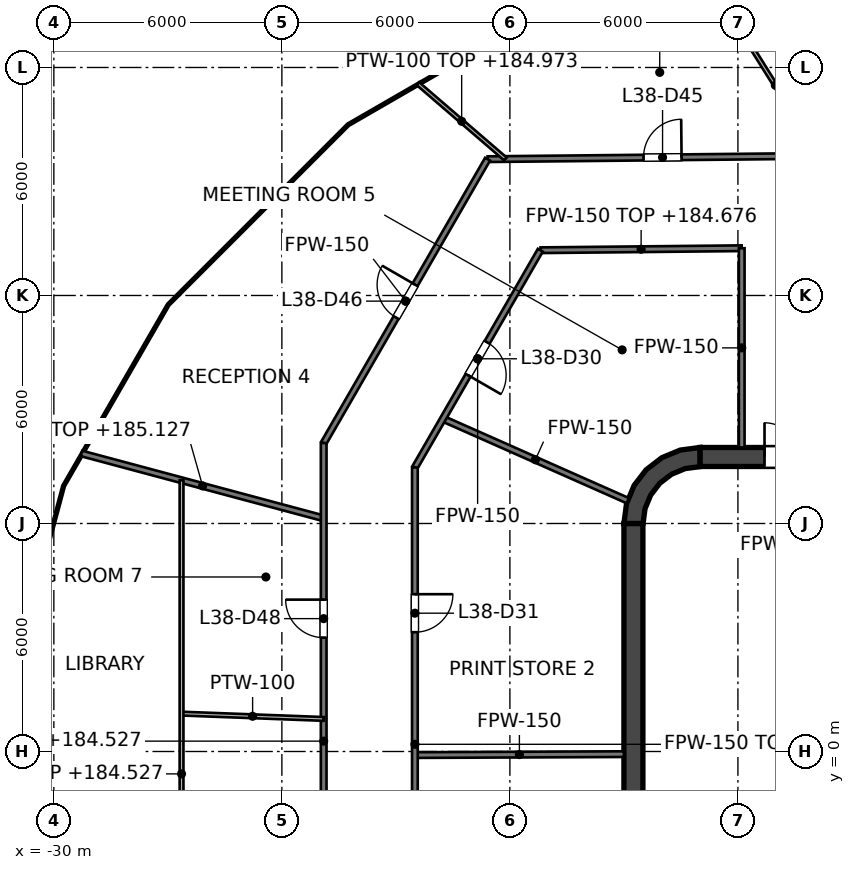
"""IFC4 building model, lengths in metres.
Left out: names, types, materials, properties, quantities, classifications, styles, units other than length and angle.
Written with IfcOpenShell. Run it as: python <this file> out.ifc"""

import sys

from ifc_helpers import new_model, si_unit, direction, frame, frame_2d, origin, place, context, subcontext, project, spatial, polyline, rectangle, outline, extrude, element, fill, save


model = new_model("IFC4")
c1 = context("Model", 3, precision=1e-05, world=origin(), true_north=direction((0.0, 1.0)))
c2 = subcontext(c1, "Body", "Model", "MODEL_VIEW")
j1 = project(units=[si_unit("LENGTHUNIT", "METRE"), si_unit("PLANEANGLEUNIT", "RADIAN")], contexts=[c1])
p1 = place(None, origin())
s1 = spatial("IfcSite", under=j1, at=p1, CompositionType="ELEMENT")
p2 = place(p1, origin())
s2 = spatial("IfcBuilding", under=s1, at=p2, CompositionType="ELEMENT")
p3 = place(p2, frame((0.0, 0.0, 181.6)))
s3 = spatial("IfcBuildingStorey", under=s2, at=p3, CompositionType="ELEMENT", Elevation=181.6)
p4 = place(p3, frame((-13.0, 7.75, 0.0), z_axis=(0.0, 0.0, 1.0), x_axis=(1.0, 0.0, 0.0)))
e1 = element("IfcWall", 1, at=p4, inside=s3, PredefinedType="SHEAR", context=c2, shape_type="SweptSolid", body=[
    extrude(rectangle(XDim=26.0, YDim=0.5, at=frame_2d((13.0, 0.0))), origin(), (0.0, 0.0, 1.0), 4.0),
])
p5 = place(p4, frame((1.7, 0.0, 0.0)))
e2 = element("IfcOpeningElement", 2, at=p5, cuts=e1, PredefinedType="OPENING", context=c2, shape_type="SweptSolid", body=[
    extrude(rectangle(XDim=1.8, YDim=2.1, at=frame_2d((0.9, 1.05))), frame((0.0, 0.25, 0.0), z_axis=(0.0, -1.0, 0.0), x_axis=(1.0, 0.0, 0.0)), (0.0, 0.0, 1.0), 0.5),
])
p6 = place(p4, frame((22.5, 0.0, 0.0)))
e3 = element("IfcOpeningElement", 3, at=p6, cuts=e1, PredefinedType="OPENING", context=c2, shape_type="SweptSolid", body=[
    extrude(rectangle(XDim=1.8, YDim=2.1, at=frame_2d((0.9, 1.05))), frame((0.0, 0.25, 0.0), z_axis=(0.0, -1.0, 0.0), x_axis=(1.0, 0.0, 0.0)), (0.0, 0.0, 1.0), 0.5),
])
p7 = place(p3, frame((-14.75, -6.0, 0.0), z_axis=(0.0, 0.0, 1.0), x_axis=(0.0, 1.0, 0.0)))
e4 = element("IfcWall", 4, at=p7, inside=s3, PredefinedType="SHEAR", context=c2, shape_type="SweptSolid", body=[
    extrude(rectangle(XDim=12.0, YDim=0.5, at=frame_2d((6.0, 0.0))), origin(), (0.0, 0.0, 1.0), 4.0),
])
p8 = place(p3, origin())
e5 = element("IfcWall", 5, at=p8, inside=s3, PredefinedType="SHEAR", context=c2, shape_type="SweptSolid", body=[
    extrude(outline(polyline([(-15.0, 6.0), (-14.496, 6.0), (-14.445, 6.387), (-14.295, 6.748), (-14.058, 7.058), (-13.748, 7.295), (-13.387, 7.445), (-13.0, 7.496), (-13.0, 8.0), (-13.518, 7.932), (-14.0, 7.732), (-14.414, 7.414), (-14.732, 7.0), (-14.932, 6.518), (-15.0, 6.0)])), origin(), (0.0, 0.0, 1.0), 4.0),
])
p9 = place(p3, frame((-11.8, -7.5, 0.0), z_axis=(0.0, 0.0, 1.0), x_axis=(0.0, 1.0, 0.0)))
e6 = element("IfcWall", 6, at=p9, inside=s3, PredefinedType="SOLIDWALL", context=c2, shape_type="SweptSolid", body=[
    extrude(rectangle(XDim=15.0, YDim=0.4, at=frame_2d((7.5, 0.0))), origin(), (0.0, 0.0, 1.0), 3.85),
])
p10 = place(p9, frame((11.3, 0.0, 0.0)))
e7 = element("IfcOpeningElement", 7, at=p10, cuts=e6, PredefinedType="OPENING", context=c2, shape_type="SweptSolid", body=[
    extrude(rectangle(XDim=1.1, YDim=2.1, at=frame_2d((0.55, 1.05))), frame((0.0, 0.2, 0.0), z_axis=(0.0, -1.0, 0.0), x_axis=(1.0, 0.0, 0.0)), (0.0, 0.0, 1.0), 0.4),
])
p11 = place(p9, frame((8.4, 0.0, 0.0)))
e8 = element("IfcOpeningElement", 8, at=p11, cuts=e6, PredefinedType="OPENING", context=c2, shape_type="SweptSolid", body=[
    extrude(rectangle(XDim=1.1, YDim=2.1, at=frame_2d((0.55, 1.05))), frame((0.0, 0.2, 0.0), z_axis=(0.0, -1.0, 0.0), x_axis=(1.0, 0.0, 0.0)), (0.0, 0.0, 1.0), 0.4),
])
p12 = place(p9, frame((5.5, 0.0, 0.0)))
e9 = element("IfcOpeningElement", 9, at=p12, cuts=e6, PredefinedType="OPENING", context=c2, shape_type="SweptSolid", body=[
    extrude(rectangle(XDim=1.1, YDim=2.1, at=frame_2d((0.55, 1.05))), frame((0.0, 0.2, 0.0), z_axis=(0.0, -1.0, 0.0), x_axis=(1.0, 0.0, 0.0)), (0.0, 0.0, 1.0), 0.4),
])
p13 = place(p9, frame((13.697, 0.0, 0.0)))
e10 = element("IfcOpeningElement", 10, at=p13, cuts=e6, PredefinedType="OPENING", context=c2, shape_type="SweptSolid", body=[
    extrude(rectangle(XDim=0.9, YDim=2.1, at=frame_2d((0.45, 1.05))), frame((0.0, 0.2, 0.0), z_axis=(0.0, -1.0, 0.0), x_axis=(1.0, 0.0, 0.0)), (0.0, 0.0, 1.0), 0.4),
])
p14 = place(p9, frame((0.403, 0.0, 0.0)))
e11 = element("IfcOpeningElement", 11, at=p14, cuts=e6, PredefinedType="OPENING", context=c2, shape_type="SweptSolid", body=[
    extrude(rectangle(XDim=0.9, YDim=2.1, at=frame_2d((0.45, 1.05))), frame((0.0, 0.2, 0.0), z_axis=(0.0, -1.0, 0.0), x_axis=(1.0, 0.0, 0.0)), (0.0, 0.0, 1.0), 0.4),
])
e12 = element("IfcWall", 12, at=p8, inside=s3, PredefinedType="SOLIDWALL", context=c2, shape_type="SweptSolid", body=[
    extrude(outline(polyline([(-12.0, -5.925), (-12.0, -5.675), (-14.25, -5.675), (-14.25, -3.025), (-12.0, -3.025), (-12.0, -2.775), (-14.25, -2.775), (-14.25, -0.125), (-12.0, -0.125), (-12.0, 0.125), (-14.25, 0.125), (-14.25, 2.775), (-12.0, 2.775), (-12.0, 3.025), (-14.25, 3.025), (-14.25, 5.675), (-12.0, 5.675), (-12.0, 5.925), (-14.25, 5.925), (-14.5, 5.925), (-14.5, 5.675), (-14.5, 3.025), (-14.5, 2.775), (-14.5, 0.125), (-14.5, -0.125), (-14.5, -2.775), (-14.5, -3.025), (-14.5, -5.675), (-14.5, -5.925), (-14.25, -5.925), (-12.0, -5.925)])), origin(), (0.0, 0.0, 1.0), 3.85),
])
p15 = place(p3, frame((-19.76, 8.755, 0.0), z_axis=(0.0, 0.0, 1.0), x_axis=(0.91424834547, -0.405154245695, 0.0)))
e13 = element("IfcWall", 13, at=p15, inside=s3, PredefinedType="PARTITIONING", context=c2, shape_type="SweptSolid", body=[
    extrude(rectangle(XDim=5.318, YDim=0.15, at=frame_2d((2.659, 0.0))), origin(), (0.0, 0.0, 1.0), 2.995),
])
p16 = place(p3, frame((-29.272, 7.843, 0.0), z_axis=(0.0, 0.0, 1.0), x_axis=(0.965939462112, -0.258768150157, 0.0)))
e14 = element("IfcWall", 14, at=p16, inside=s3, PredefinedType="PARTITIONING", context=c2, shape_type="SweptSolid", body=[
    extrude(rectangle(XDim=6.597, YDim=0.15, at=frame_2d((3.298, 0.0))), origin(), (0.0, 0.0, 1.0), 3.527),
])
p17 = place(p3, frame((-20.5, -0.094, 0.0), z_axis=(0.0, 0.0, 1.0), x_axis=(0.999990148138, 0.004438876723, 0.0)))
e15 = element("IfcWall", 15, at=p17, inside=s3, PredefinedType="PARTITIONING", context=c2, shape_type="SweptSolid", body=[
    extrude(rectangle(XDim=5.5, YDim=0.15, at=frame_2d((2.75, 0.0))), origin(), (0.0, 0.0, 1.0), 2.995),
])
p18 = place(p3, frame((-17.194, 13.191, 0.0), z_axis=(0.0, 0.0, 1.0), x_axis=(0.999950394899, 0.009960308291, 0.0)))
e16 = element("IfcWall", 16, at=p18, inside=s3, PredefinedType="PARTITIONING", context=c2, shape_type="SweptSolid", body=[
    extrude(rectangle(XDim=5.294, YDim=0.15, at=frame_2d((2.647, 0.0))), origin(), (0.0, 0.0, 1.0), 3.076),
])
p19 = place(p3, frame((-18.587, 15.587, 0.0), z_axis=(0.0, 0.0, 1.0), x_axis=(0.99995051, 0.009948746191, 0.0)))
e17 = element("IfcWall", 17, at=p19, inside=s3, PredefinedType="PARTITIONING", context=c2, shape_type="SweptSolid", body=[
    extrude(rectangle(XDim=33.669, YDim=0.15, at=frame_2d((16.834, 0.0))), origin(), (0.0, 0.0, 1.0), 2.927),
])
p20 = place(p19, frame((26.125, 0.0, 0.0)))
e18 = element("IfcOpeningElement", 18, at=p20, cuts=e17, PredefinedType="OPENING", context=c2, shape_type="SweptSolid", body=[
    extrude(rectangle(XDim=1.0, YDim=2.1, at=frame_2d((0.5, 1.05))), frame((0.0, 0.075, 0.0), z_axis=(0.0, -1.0, 0.0), x_axis=(1.0, 0.0, 0.0)), (0.0, 0.0, 1.0), 0.15),
])
p21 = place(p19, frame((16.936, 0.0, 0.0)))
e19 = element("IfcOpeningElement", 19, at=p21, cuts=e17, PredefinedType="OPENING", context=c2, shape_type="SweptSolid", body=[
    extrude(rectangle(XDim=1.0, YDim=2.1, at=frame_2d((0.5, 1.05))), frame((0.0, 0.075, 0.0), z_axis=(0.0, -1.0, 0.0), x_axis=(1.0, 0.0, 0.0)), (0.0, 0.0, 1.0), 0.15),
])
p22 = place(p19, frame((15.079, 0.0, 0.0)))
e20 = element("IfcOpeningElement", 20, at=p22, cuts=e17, PredefinedType="OPENING", context=c2, shape_type="SweptSolid", body=[
    extrude(rectangle(XDim=1.0, YDim=2.1, at=frame_2d((0.5, 1.05))), frame((0.0, 0.075, 0.0), z_axis=(0.0, -1.0, 0.0), x_axis=(1.0, 0.0, 0.0)), (0.0, 0.0, 1.0), 0.15),
])
p23 = place(p19, frame((11.056, 0.0, 0.0)))
e21 = element("IfcOpeningElement", 21, at=p23, cuts=e17, PredefinedType="OPENING", context=c2, shape_type="SweptSolid", body=[
    extrude(rectangle(XDim=1.0, YDim=2.1, at=frame_2d((0.5, 1.05))), frame((0.0, 0.075, 0.0), z_axis=(0.0, -1.0, 0.0), x_axis=(1.0, 0.0, 0.0)), (0.0, 0.0, 1.0), 0.15),
])
p24 = place(p19, frame((4.104, 0.0, 0.0)))
e22 = element("IfcOpeningElement", 22, at=p24, cuts=e17, PredefinedType="OPENING", context=c2, shape_type="SweptSolid", body=[
    extrude(rectangle(XDim=1.0, YDim=2.1, at=frame_2d((0.5, 1.05))), frame((0.0, 0.075, 0.0), z_axis=(0.0, -1.0, 0.0), x_axis=(1.0, 0.0, 0.0)), (0.0, 0.0, 1.0), 0.15),
])
p25 = place(p3, frame((-20.5, 7.474, 0.0), z_axis=(0.0, 0.0, 1.0), x_axis=(0.500012665616, 0.866018091164, 0.0)))
e23 = element("IfcWall", 23, at=p25, inside=s3, PredefinedType="PARTITIONING", context=c2, shape_type="SweptSolid", body=[
    extrude(rectangle(XDim=6.602, YDim=0.15, at=frame_2d((3.301, 0.0))), origin(), (0.0, 0.0, 1.0), 2.995),
])
p26 = place(p25, frame((2.803, 0.0, 0.0)))
e24 = element("IfcOpeningElement", 24, at=p26, cuts=e23, PredefinedType="OPENING", context=c2, shape_type="SweptSolid", body=[
    extrude(rectangle(XDim=1.0, YDim=2.1, at=frame_2d((0.5, 1.05))), frame((0.0, 0.075, 0.0), z_axis=(0.0, -1.0, 0.0), x_axis=(1.0, 0.0, 0.0)), (0.0, 0.0, 1.0), 0.15),
])
p27 = place(p3, frame((-22.9, 8.117, 0.0), z_axis=(0.0, 0.0, 1.0), x_axis=(0.499983791763, 0.866034761412, 0.0)))
e25 = element("IfcWall", 25, at=p27, inside=s3, PredefinedType="PARTITIONING", context=c2, shape_type="SweptSolid", body=[
    extrude(rectangle(XDim=8.626, YDim=0.15, at=frame_2d((4.313, 0.0))), origin(), (0.0, 0.0, 1.0), 2.995),
])
p28 = place(p27, frame((3.812, 0.0, 0.0)))
e26 = element("IfcOpeningElement", 26, at=p28, cuts=e25, PredefinedType="OPENING", context=c2, shape_type="SweptSolid", body=[
    extrude(rectangle(XDim=1.0, YDim=2.1, at=frame_2d((0.5, 1.05))), frame((0.0, 0.075, 0.0), z_axis=(0.0, -1.0, 0.0), x_axis=(1.0, 0.0, 0.0)), (0.0, 0.0, 1.0), 0.15),
])
p29 = place(p3, frame((-11.9, 8.0, 0.0), z_axis=(0.0, 0.0, 1.0), x_axis=(0.0, 1.0, 0.0)))
e27 = element("IfcWall", 27, at=p29, inside=s3, PredefinedType="PARTITIONING", context=c2, shape_type="SweptSolid", body=[
    extrude(rectangle(XDim=5.243, YDim=0.15, at=frame_2d((2.622, 0.0))), origin(), (0.0, 0.0, 1.0), 2.995),
])
p30 = place(p3, frame((-20.5, -7.095, 0.0), z_axis=(0.0, 0.0, 1.0), x_axis=(0.0, 1.0, 0.0)))
e28 = element("IfcWall", 28, at=p30, inside=s3, PredefinedType="PARTITIONING", context=c2, shape_type="SweptSolid", body=[
    extrude(rectangle(XDim=14.569, YDim=0.15, at=frame_2d((7.285, 0.0))), origin(), (0.0, 0.0, 1.0), 2.927),
])
p31 = place(p30, frame((10.234, 0.0, 0.0)))
e29 = element("IfcOpeningElement", 29, at=p31, cuts=e28, PredefinedType="OPENING", context=c2, shape_type="SweptSolid", body=[
    extrude(rectangle(XDim=1.0, YDim=2.1, at=frame_2d((0.5, 1.05))), frame((0.0, 0.075, 0.0), z_axis=(0.0, -1.0, 0.0), x_axis=(1.0, 0.0, 0.0)), (0.0, 0.0, 1.0), 0.15),
])
p32 = place(p30, frame((3.0, 0.0, 0.0)))
e30 = element("IfcOpeningElement", 30, at=p32, cuts=e28, PredefinedType="OPENING", context=c2, shape_type="SweptSolid", body=[
    extrude(rectangle(XDim=1.0, YDim=2.1, at=frame_2d((0.5, 1.05))), frame((0.0, 0.075, 0.0), z_axis=(0.0, -1.0, 0.0), x_axis=(1.0, 0.0, 0.0)), (0.0, 0.0, 1.0), 0.15),
])
p33 = place(p3, frame((-22.9, -7.572, 0.0), z_axis=(0.0, 0.0, 1.0), x_axis=(0.0, 1.0, 0.0)))
e31 = element("IfcWall", 31, at=p33, inside=s3, PredefinedType="PARTITIONING", context=c2, shape_type="SweptSolid", body=[
    extrude(rectangle(XDim=15.689, YDim=0.15, at=frame_2d((7.844, 0.0))), origin(), (0.0, 0.0, 1.0), 2.927),
])
p34 = place(p33, frame((10.569, 0.0, 0.0)))
e32 = element("IfcOpeningElement", 32, at=p34, cuts=e31, PredefinedType="OPENING", context=c2, shape_type="SweptSolid", body=[
    extrude(rectangle(XDim=1.0, YDim=2.1, at=frame_2d((0.5, 1.05))), frame((0.0, 0.075, 0.0), z_axis=(0.0, -1.0, 0.0), x_axis=(1.0, 0.0, 0.0)), (0.0, 0.0, 1.0), 0.15),
])
p35 = place(p33, frame((5.282, 0.0, 0.0)))
e33 = element("IfcOpeningElement", 33, at=p35, cuts=e31, PredefinedType="OPENING", context=c2, shape_type="SweptSolid", body=[
    extrude(rectangle(XDim=1.0, YDim=2.1, at=frame_2d((0.5, 1.05))), frame((0.0, 0.075, 0.0), z_axis=(0.0, -1.0, 0.0), x_axis=(1.0, 0.0, 0.0)), (0.0, 0.0, 1.0), 0.15),
])
p36 = place(p3, frame((-12.183, 19.391, 0.0), z_axis=(0.0, 0.0, 1.0), x_axis=(0.531972202613, -0.846761817542, 0.0)))
e34 = element("IfcWall", 34, at=p36, inside=s3, PredefinedType="PARTITIONING", context=c2, shape_type="SweptSolid", body=[
    extrude(rectangle(XDim=4.39, YDim=0.1, at=frame_2d((2.195, 0.0))), origin(), (0.0, 0.0, 1.0), 3.85),
])
p37 = place(p3, frame((-20.421, 17.575, 0.0), z_axis=(0.0, 0.0, 1.0), x_axis=(0.757939763132, -0.652324547648, 0.0)))
e35 = element("IfcWall", 35, at=p37, inside=s3, PredefinedType="PARTITIONING", context=c2, shape_type="SweptSolid", body=[
    extrude(rectangle(XDim=3.04, YDim=0.1, at=frame_2d((1.52, 0.0))), origin(), (0.0, 0.0, 1.0), 3.373),
])
p38 = place(p3, frame((-26.64, 0.997, 0.0), z_axis=(0.0, 0.0, 1.0), x_axis=(0.999298745045, -0.037443532845, 0.0)))
e36 = element("IfcWall", 36, at=p38, inside=s3, PredefinedType="PARTITIONING", context=c2, shape_type="SweptSolid", body=[
    extrude(rectangle(XDim=3.743, YDim=0.1, at=frame_2d((1.871, 0.0))), origin(), (0.0, 0.0, 1.0), 3.85),
])
p39 = place(p3, frame((-26.64, -8.316, 0.0), z_axis=(0.0, 0.0, 1.0), x_axis=(0.0, 1.0, 0.0)))
e37 = element("IfcWall", 37, at=p39, inside=s3, PredefinedType="PARTITIONING", context=c2, shape_type="SweptSolid", body=[
    extrude(rectangle(XDim=15.454, YDim=0.1, at=frame_2d((7.727, 0.0))), origin(), (0.0, 0.0, 1.0), 2.927),
])
p40 = place(p10, origin())
e38 = element("IfcDoor", 38, at=p40, inside=s3, OperationType="DOUBLE_DOOR_SLIDING", PredefinedType="DOOR", context=c2, shape_type="SweptSolid", body=[
    extrude(rectangle(XDim=1.1, YDim=2.1, at=frame_2d((0.55, 1.05))), frame((0.0, 0.025, 0.0), z_axis=(0.0, -1.0, 0.0), x_axis=(1.0, 0.0, 0.0)), (0.0, 0.0, 1.0), 0.05),
])
fill(e7, e38)
p41 = place(p11, origin())
e39 = element("IfcDoor", 39, at=p41, inside=s3, OperationType="DOUBLE_DOOR_SLIDING", PredefinedType="DOOR", context=c2, shape_type="SweptSolid", body=[
    extrude(rectangle(XDim=1.1, YDim=2.1, at=frame_2d((0.55, 1.05))), frame((0.0, 0.025, 0.0), z_axis=(0.0, -1.0, 0.0), x_axis=(1.0, 0.0, 0.0)), (0.0, 0.0, 1.0), 0.05),
])
fill(e8, e39)
p42 = place(p12, origin())
e40 = element("IfcDoor", 40, at=p42, inside=s3, OperationType="DOUBLE_DOOR_SLIDING", PredefinedType="DOOR", context=c2, shape_type="SweptSolid", body=[
    extrude(rectangle(XDim=1.1, YDim=2.1, at=frame_2d((0.55, 1.05))), frame((0.0, 0.025, 0.0), z_axis=(0.0, -1.0, 0.0), x_axis=(1.0, 0.0, 0.0)), (0.0, 0.0, 1.0), 0.05),
])
fill(e9, e40)
p43 = place(p13, origin())
e41 = element("IfcDoor", 41, at=p43, inside=s3, OperationType="SINGLE_SWING_LEFT", PredefinedType="DOOR", context=c2, shape_type="SweptSolid", body=[
    extrude(rectangle(XDim=0.9, YDim=2.1, at=frame_2d((0.45, 1.05))), frame((0.0, 0.025, 0.0), z_axis=(0.0, -1.0, 0.0), x_axis=(1.0, 0.0, 0.0)), (0.0, 0.0, 1.0), 0.05),
])
fill(e10, e41)
p44 = place(p5, origin())
e42 = element("IfcDoor", 42, at=p44, inside=s3, OperationType="DOUBLE_DOOR_SINGLE_SWING", PredefinedType="DOOR", context=c2, shape_type="SweptSolid", body=[
    extrude(rectangle(XDim=1.8, YDim=2.1, at=frame_2d((0.9, 1.05))), frame((0.0, 0.025, 0.0), z_axis=(0.0, -1.0, 0.0), x_axis=(1.0, 0.0, 0.0)), (0.0, 0.0, 1.0), 0.05),
])
fill(e2, e42)
p45 = place(p26, origin())
e43 = element("IfcDoor", 43, at=p45, inside=s3, OperationType="SINGLE_SWING_LEFT", PredefinedType="DOOR", context=c2, shape_type="SweptSolid", body=[
    extrude(rectangle(XDim=1.0, YDim=2.1, at=frame_2d((0.5, 1.05))), frame((0.0, 0.025, 0.0), z_axis=(0.0, -1.0, 0.0), x_axis=(1.0, 0.0, 0.0)), (0.0, 0.0, 1.0), 0.05),
])
fill(e24, e43)
p46 = place(p31, origin())
e44 = element("IfcDoor", 44, at=p46, inside=s3, OperationType="SINGLE_SWING_RIGHT", PredefinedType="DOOR", context=c2, shape_type="SweptSolid", body=[
    extrude(rectangle(XDim=1.0, YDim=2.1, at=frame_2d((0.5, 1.05))), frame((0.0, 0.025, 0.0), z_axis=(0.0, -1.0, 0.0), x_axis=(1.0, 0.0, 0.0)), (0.0, 0.0, 1.0), 0.05),
])
fill(e29, e44)
p47 = place(p24, origin())
e45 = element("IfcDoor", 45, at=p47, inside=s3, OperationType="SINGLE_SWING_RIGHT", PredefinedType="DOOR", context=c2, shape_type="SweptSolid", body=[
    extrude(rectangle(XDim=1.0, YDim=2.1, at=frame_2d((0.5, 1.05))), frame((0.0, 0.025, 0.0), z_axis=(0.0, -1.0, 0.0), x_axis=(1.0, 0.0, 0.0)), (0.0, 0.0, 1.0), 0.05),
])
fill(e22, e45)
p48 = place(p28, origin())
e46 = element("IfcDoor", 46, at=p48, inside=s3, OperationType="SINGLE_SWING_RIGHT", PredefinedType="DOOR", context=c2, shape_type="SweptSolid", body=[
    extrude(rectangle(XDim=1.0, YDim=2.1, at=frame_2d((0.5, 1.05))), frame((0.0, 0.025, 0.0), z_axis=(0.0, -1.0, 0.0), x_axis=(1.0, 0.0, 0.0)), (0.0, 0.0, 1.0), 0.05),
])
fill(e26, e46)
p49 = place(p34, origin())
e47 = element("IfcDoor", 47, at=p49, inside=s3, OperationType="SINGLE_SWING_RIGHT", PredefinedType="DOOR", context=c2, shape_type="SweptSolid", body=[
    extrude(rectangle(XDim=1.0, YDim=2.1, at=frame_2d((0.5, 1.05))), frame((0.0, 0.025, 0.0), z_axis=(0.0, -1.0, 0.0), x_axis=(1.0, 0.0, 0.0)), (0.0, 0.0, 1.0), 0.05),
])
fill(e32, e47)
save(model, sys.argv[1])
